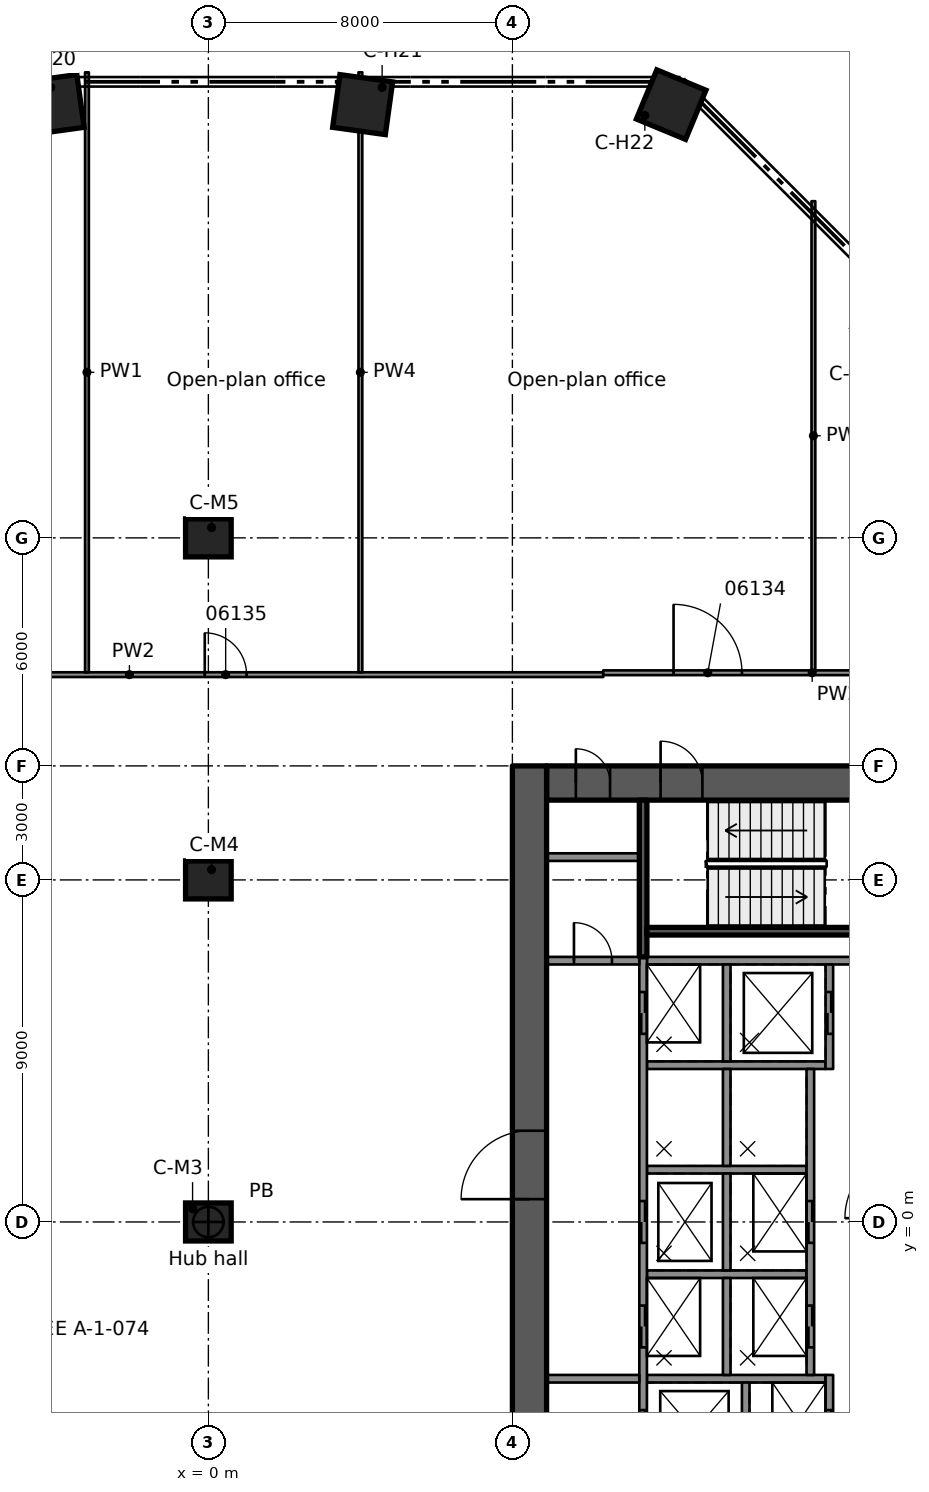
"""IFC4 building model, lengths in metres.
Left out: names, types, materials, properties, quantities, classifications, styles, units other than length and angle.
Written with IfcOpenShell. Run it as: python <this file> out.ifc"""

import sys

from ifc_helpers import new_model, si_unit, direction, frame, frame_2d, origin, origin_2d, place, context, subcontext, project, spatial, rectangle, extrude, element, fill, save


model = new_model("IFC4")
c1 = context("Model", 3, precision=1e-05, world=origin(), true_north=direction((0.0, 1.0)))
c2 = subcontext(c1, "Body", "Model", "MODEL_VIEW")
j1 = project(units=[si_unit("LENGTHUNIT", "METRE"), si_unit("PLANEANGLEUNIT", "RADIAN")], contexts=[c1])
p1 = place(None, origin())
s1 = spatial("IfcSite", under=j1, at=p1, CompositionType="ELEMENT")
p2 = place(p1, origin())
s2 = spatial("IfcBuilding", under=s1, at=p2, CompositionType="ELEMENT")
p3 = place(p2, frame((0.0, 0.0, 29.2)))
s3 = spatial("IfcBuildingStorey", under=s2, at=p3, CompositionType="ELEMENT", Elevation=29.2)
p4 = place(p3, frame((8.9, 11.55, 0.0), z_axis=(0.0, 0.0, 1.0), x_axis=(1.0, 0.0, 0.0)))
e1 = element("IfcWall", 1, at=p4, inside=s3, PredefinedType="SHEAR", context=c2, shape_type="SweptSolid", body=[
    extrude(rectangle(XDim=9.2, YDim=0.9, at=frame_2d((4.6, 0.0))), origin(), (0.0, 0.0, 1.0), 4.1),
])
p5 = place(p4, frame((3.0, 0.0, 0.0)))
e2 = element("IfcOpeningElement", 2, at=p5, cuts=e1, PredefinedType="OPENING", context=c2, shape_type="SweptSolid", body=[
    extrude(rectangle(XDim=1.1, YDim=2.1, at=frame_2d((0.55, 1.05))), frame((0.0, 0.46, 0.0), z_axis=(0.0, -1.0, 0.0), x_axis=(1.0, 0.0, 0.0)), (0.0, 0.0, 1.0), 0.92),
])
p6 = place(p4, frame((0.77, 0.0, 0.0)))
e3 = element("IfcOpeningElement", 3, at=p6, cuts=e1, PredefinedType="OPENING", context=c2, shape_type="SweptSolid", body=[
    extrude(rectangle(XDim=0.9, YDim=2.1, at=frame_2d((0.45, 1.05))), frame((0.0, 0.46, 0.0), z_axis=(0.0, -1.0, 0.0), x_axis=(1.0, 0.0, 0.0)), (0.0, 0.0, 1.0), 0.92),
])
p7 = place(p3, frame((8.45, -12.0, 0.0), z_axis=(0.0, 0.0, 1.0), x_axis=(0.0, 1.0, 0.0)))
e4 = element("IfcWall", 4, at=p7, inside=s3, PredefinedType="SHEAR", context=c2, shape_type="SweptSolid", body=[
    extrude(rectangle(XDim=24.0, YDim=0.9, at=frame_2d((12.0, 0.0))), origin(), (0.0, 0.0, 1.0), 4.1),
])
p8 = place(p7, frame((12.6, 0.0, 0.0)))
e5 = element("IfcOpeningElement", 5, at=p8, cuts=e4, PredefinedType="OPENING", context=c2, shape_type="SweptSolid", body=[
    extrude(rectangle(XDim=1.8, YDim=2.1, at=frame_2d((0.9, 1.05))), frame((0.0, 0.46, 0.0), z_axis=(0.0, -1.0, 0.0), x_axis=(1.0, 0.0, 0.0)), (0.0, 0.0, 1.0), 0.92),
])
p9 = place(p7, frame((3.25, 0.0, 0.0)))
e6 = element("IfcOpeningElement", 6, at=p9, cuts=e4, PredefinedType="OPENING", context=c2, shape_type="SweptSolid", body=[
    extrude(rectangle(XDim=1.1, YDim=2.1, at=frame_2d((0.55, 1.05))), frame((0.0, 0.46, 0.0), z_axis=(0.0, -1.0, 0.0), x_axis=(1.0, 0.0, 0.0)), (0.0, 0.0, 1.0), 0.92),
])
for number, where, z_axis, x_axis in (
    (7, (-4.059, 29.4, 0.0), (0.0, 0.0, 1.0), (-0.137, 0.991, 0.0)),
    (8, (4.059, 29.4, 0.0), (0.0, 0.0, 1.0), (0.137, 0.991, 0.0)),
    (9, (12.178, 29.4, 0.0), (0.0, 0.0, 1.0), (0.383, 0.924, 0.0)),
):
    element("IfcColumn", number, at=place(p3, frame(where, z_axis=z_axis, x_axis=x_axis)), inside=s3, PredefinedType="COLUMN", context=c2, shape_type="SweptSolid", body=[
        extrude(rectangle(XDim=1.4, YDim=1.4, at=origin_2d()), origin(), (0.0, 0.0, 1.0), 4.1),
    ])
for number, where, z_axis, x_axis in (
    (10, (0.0, 0.0, 0.0), (0.0, 0.0, 1.0), (1.0, 0.0, 0.0)),
    (11, (0.0, 9.0, 0.0), (0.0, 0.0, 1.0), (1.0, 0.0, 0.0)),
    (12, (0.0, 18.0, 0.0), (0.0, 0.0, 1.0), (1.0, 0.0, 0.0)),
):
    element("IfcColumn", number, at=place(p3, frame(where, z_axis=z_axis, x_axis=x_axis)), inside=s3, PredefinedType="COLUMN", context=c2, shape_type="SweptSolid", body=[
        extrude(rectangle(XDim=1.2, YDim=1.0, at=origin_2d()), origin(), (0.0, 0.0, 1.0), 4.1),
    ])
p10 = place(p3, frame((11.54, 6.875, 0.0), z_axis=(0.0, 0.0, 1.0), x_axis=(1.0, 0.0, 0.0)))
e13 = element("IfcWall", 13, at=p10, inside=s3, PredefinedType="SOLIDWALL", context=c2, shape_type="SweptSolid", body=[
    extrude(rectangle(XDim=6.56, YDim=0.2, at=frame_2d((3.28, 0.0))), origin(), (0.0, 0.0, 1.0), 3.68),
])
p11 = place(p3, frame((11.54, 4.125, 0.0), z_axis=(0.0, 0.0, 1.0), x_axis=(1.0, 0.0, 0.0)))
e14 = element("IfcWall", 14, at=p11, inside=s3, PredefinedType="SOLIDWALL", context=c2, shape_type="SweptSolid", body=[
    extrude(rectangle(XDim=4.7, YDim=0.2, at=frame_2d((2.35, 0.0))), origin(), (0.0, 0.0, 1.0), 3.68),
])
for number, where, z_axis, x_axis in (
    (15, (11.54, 1.375, 0.0), (0.0, 0.0, 1.0), (1.0, 0.0, 0.0)),
    (16, (11.54, -1.375, 0.0), (0.0, 0.0, 1.0), (1.0, 0.0, 0.0)),
):
    element("IfcWall", number, at=place(p3, frame(where, z_axis=z_axis, x_axis=x_axis)), inside=s3, PredefinedType="SOLIDWALL", context=c2, shape_type="SweptSolid", body=[
        extrude(rectangle(XDim=4.2, YDim=0.2, at=frame_2d((2.1, 0.0))), origin(), (0.0, 0.0, 1.0), 3.68),
    ])
p12 = place(p3, frame((11.54, -4.125, 0.0), z_axis=(0.0, 0.0, 1.0), x_axis=(1.0, 0.0, 0.0)))
e17 = element("IfcWall", 17, at=p12, inside=s3, PredefinedType="SOLIDWALL", context=c2, shape_type="SweptSolid", body=[
    extrude(rectangle(XDim=4.7, YDim=0.2, at=frame_2d((2.35, 0.0))), origin(), (0.0, 0.0, 1.0), 3.68),
])
p13 = place(p3, frame((11.44, 6.975, 0.0), z_axis=(0.0, 0.0, 1.0), x_axis=(0.0, -1.0, 0.0)))
e18 = element("IfcWall", 18, at=p13, inside=s3, PredefinedType="SOLIDWALL", context=c2, shape_type="SweptSolid", body=[
    extrude(rectangle(XDim=13.95, YDim=0.2, at=frame_2d((6.975, 0.0))), origin(), (0.0, 0.0, 1.0), 3.68),
])
p14 = place(p13, frame((0.925, 0.0, 0.0)))
e19 = element("IfcOpeningElement", 19, at=p14, cuts=e18, PredefinedType="OPENING", context=c2, shape_type="SweptSolid", body=[
    extrude(rectangle(XDim=1.1, YDim=2.1, at=frame_2d((0.55, 1.05))), frame((0.0, 0.11, 0.0), z_axis=(0.0, -1.0, 0.0), x_axis=(1.0, 0.0, 0.0)), (0.0, 0.0, 1.0), 0.22),
])
p15 = place(p13, frame((6.425, 0.0, 0.0)))
e20 = element("IfcOpeningElement", 20, at=p15, cuts=e18, PredefinedType="OPENING", context=c2, shape_type="SweptSolid", body=[
    extrude(rectangle(XDim=1.1, YDim=2.1, at=frame_2d((0.55, 1.05))), frame((0.0, 0.11, 0.0), z_axis=(0.0, -1.0, 0.0), x_axis=(1.0, 0.0, 0.0)), (0.0, 0.0, 1.0), 0.22),
])
p16 = place(p13, frame((9.175, 0.0, 0.0)))
e21 = element("IfcOpeningElement", 21, at=p16, cuts=e18, PredefinedType="OPENING", context=c2, shape_type="SweptSolid", body=[
    extrude(rectangle(XDim=1.1, YDim=2.1, at=frame_2d((0.55, 1.05))), frame((0.0, 0.11, 0.0), z_axis=(0.0, -1.0, 0.0), x_axis=(1.0, 0.0, 0.0)), (0.0, 0.0, 1.0), 0.22),
])
p17 = place(p13, frame((11.925, 0.0, 0.0)))
e22 = element("IfcOpeningElement", 22, at=p17, cuts=e18, PredefinedType="OPENING", context=c2, shape_type="SweptSolid", body=[
    extrude(rectangle(XDim=1.1, YDim=2.1, at=frame_2d((0.55, 1.05))), frame((0.0, 0.11, 0.0), z_axis=(0.0, -1.0, 0.0), x_axis=(1.0, 0.0, 0.0)), (0.0, 0.0, 1.0), 0.22),
])
for number, where, z_axis, x_axis in (
    (23, (13.64, 6.775, 0.0), (0.0, 0.0, 1.0), (0.0, -1.0, 0.0)),
    (24, (13.64, 4.025, 0.0), (0.0, 0.0, 1.0), (0.0, -1.0, 0.0)),
    (25, (13.64, 1.275, 0.0), (0.0, 0.0, 1.0), (0.0, -1.0, 0.0)),
    (26, (13.64, -1.475, 0.0), (0.0, 0.0, 1.0), (0.0, -1.0, 0.0)),
    (27, (14.14, -4.225, 0.0), (0.0, 0.0, 1.0), (0.0, -1.0, 0.0)),
):
    element("IfcWall", number, at=place(p3, frame(where, z_axis=z_axis, x_axis=x_axis)), inside=s3, PredefinedType="SOLIDWALL", context=c2, shape_type="SweptSolid", body=[
        extrude(rectangle(XDim=2.55, YDim=0.2, at=frame_2d((1.275, 0.0))), origin(), (0.0, 0.0, 1.0), 3.68),
    ])
p18 = place(p3, frame((16.34, 6.775, 0.0), z_axis=(0.0, 0.0, 1.0), x_axis=(0.0, -1.0, 0.0)))
e28 = element("IfcWall", 28, at=p18, inside=s3, PredefinedType="SOLIDWALL", context=c2, shape_type="SweptSolid", body=[
    extrude(rectangle(XDim=2.75, YDim=0.2, at=frame_2d((1.375, 0.0))), origin(), (0.0, 0.0, 1.0), 3.68),
])
p19 = place(p18, frame((0.725, 0.0, 0.0)))
e29 = element("IfcOpeningElement", 29, at=p19, cuts=e28, PredefinedType="OPENING", context=c2, shape_type="SweptSolid", body=[
    extrude(rectangle(XDim=1.1, YDim=2.1, at=frame_2d((0.55, 1.05))), frame((0.0, 0.11, 0.0), z_axis=(0.0, -1.0, 0.0), x_axis=(1.0, 0.0, 0.0)), (0.0, 0.0, 1.0), 0.22),
])
p20 = place(p3, frame((15.84, 4.025, 0.0), z_axis=(0.0, 0.0, 1.0), x_axis=(0.0, -1.0, 0.0)))
e30 = element("IfcWall", 30, at=p20, inside=s3, PredefinedType="SOLIDWALL", context=c2, shape_type="SweptSolid", body=[
    extrude(rectangle(XDim=8.05, YDim=0.2, at=frame_2d((4.025, 0.0))), origin(), (0.0, 0.0, 1.0), 3.68),
])
p21 = place(p20, frame((3.475, 0.0, 0.0)))
e31 = element("IfcOpeningElement", 31, at=p21, cuts=e30, PredefinedType="OPENING", context=c2, shape_type="SweptSolid", body=[
    extrude(rectangle(XDim=1.1, YDim=2.1, at=frame_2d((0.55, 1.05))), frame((0.0, 0.11, 0.0), z_axis=(0.0, -1.0, 0.0), x_axis=(1.0, 0.0, 0.0)), (0.0, 0.0, 1.0), 0.22),
])
p22 = place(p20, frame((6.225, 0.0, 0.0)))
e32 = element("IfcOpeningElement", 32, at=p22, cuts=e30, PredefinedType="OPENING", context=c2, shape_type="SweptSolid", body=[
    extrude(rectangle(XDim=1.1, YDim=2.1, at=frame_2d((0.55, 1.05))), frame((0.0, 0.11, 0.0), z_axis=(0.0, -1.0, 0.0), x_axis=(1.0, 0.0, 0.0)), (0.0, 0.0, 1.0), 0.22),
])
p23 = place(p3, frame((16.34, -4.025, 0.0), z_axis=(0.0, 0.0, 1.0), x_axis=(0.0, -1.0, 0.0)))
e33 = element("IfcWall", 33, at=p23, inside=s3, PredefinedType="SOLIDWALL", context=c2, shape_type="SweptSolid", body=[
    extrude(rectangle(XDim=2.75, YDim=0.2, at=frame_2d((1.375, 0.0))), origin(), (0.0, 0.0, 1.0), 3.68),
])
p24 = place(p23, frame((0.925, 0.0, 0.0)))
e34 = element("IfcOpeningElement", 34, at=p24, cuts=e33, PredefinedType="OPENING", context=c2, shape_type="SweptSolid", body=[
    extrude(rectangle(XDim=1.1, YDim=2.1, at=frame_2d((0.55, 1.05))), frame((0.0, 0.11, 0.0), z_axis=(0.0, -1.0, 0.0), x_axis=(1.0, 0.0, 0.0)), (0.0, 0.0, 1.0), 0.22),
])
p25 = place(p3, frame((11.44, 11.1, 0.0), z_axis=(0.0, 0.0, 1.0), x_axis=(0.0, -1.0, 0.0)))
e35 = element("IfcWall", 35, at=p25, inside=s3, PredefinedType="SOLIDWALL", context=c2, shape_type="SweptSolid", body=[
    extrude(rectangle(XDim=4.125, YDim=0.2, at=frame_2d((2.062, 0.0))), origin(), (0.0, 0.0, 1.0), 3.68),
])
p26 = place(p3, frame((11.54, 7.65, 0.0), z_axis=(0.0, 0.0, 1.0), x_axis=(1.0, 0.0, 0.0)))
e36 = element("IfcWall", 36, at=p26, inside=s3, PredefinedType="SOLIDWALL", context=c2, shape_type="SweptSolid", body=[
    extrude(rectangle(XDim=6.56, YDim=0.2, at=frame_2d((3.28, 0.0))), origin(), (0.0, 0.0, 1.0), 3.68),
])
p27 = place(p3, frame((8.9, -4.125, 0.0), z_axis=(0.0, 0.0, 1.0), x_axis=(1.0, 0.0, 0.0)))
e37 = element("IfcWall", 37, at=p27, inside=s3, PredefinedType="PARTITIONING", context=c2, shape_type="SweptSolid", body=[
    extrude(rectangle(XDim=2.44, YDim=0.2, at=frame_2d((1.22, 0.0))), origin(), (0.0, 0.0, 1.0), 3.68),
])
p28 = place(p3, frame((8.9, 6.875, 0.0), z_axis=(0.0, 0.0, 1.0), x_axis=(1.0, 0.0, 0.0)))
e38 = element("IfcWall", 38, at=p28, inside=s3, PredefinedType="PARTITIONING", context=c2, shape_type="SweptSolid", body=[
    extrude(rectangle(XDim=2.44, YDim=0.2, at=frame_2d((1.22, 0.0))), origin(), (0.0, 0.0, 1.0), 3.68),
])
p29 = place(p28, frame((0.72, 0.0, 0.0)))
e39 = element("IfcOpeningElement", 39, at=p29, cuts=e38, PredefinedType="OPENING", context=c2, shape_type="SweptSolid", body=[
    extrude(rectangle(XDim=1.0, YDim=2.1, at=frame_2d((0.5, 1.05))), frame((0.0, 0.11, 0.0), z_axis=(0.0, -1.0, 0.0), x_axis=(1.0, 0.0, 0.0)), (0.0, 0.0, 1.0), 0.22),
])
p30 = place(p3, frame((8.9, 9.6, 0.0), z_axis=(0.0, 0.0, 1.0), x_axis=(1.0, 0.0, 0.0)))
e40 = element("IfcWall", 40, at=p30, inside=s3, PredefinedType="PARTITIONING", context=c2, shape_type="SweptSolid", body=[
    extrude(rectangle(XDim=2.44, YDim=0.2, at=frame_2d((1.22, 0.0))), origin(), (0.0, 0.0, 1.0), 3.68),
])
p31 = place(p3, frame((-10.39, 14.401, 0.0), z_axis=(0.0, 0.0, 1.0), x_axis=(1.0, 0.0, 0.0)))
e41 = element("IfcWall", 41, at=p31, inside=s3, PredefinedType="PARTITIONING", context=c2, shape_type="SweptSolid", body=[
    extrude(rectangle(XDim=20.781, YDim=0.125, at=frame_2d((10.391, 0.0))), origin(), (0.0, 0.0, 1.0), 3.66),
])
p32 = place(p31, frame((10.295, 0.0, 0.0)))
e42 = element("IfcOpeningElement", 42, at=p32, cuts=e41, PredefinedType="OPENING", context=c2, shape_type="SweptSolid", body=[
    extrude(rectangle(XDim=1.1, YDim=2.1, at=frame_2d((0.55, 1.05))), frame((0.0, 0.073, 0.0), z_axis=(0.0, -1.0, 0.0), x_axis=(1.0, 0.0, 0.0)), (0.0, 0.0, 1.0), 0.145),
])
p33 = place(p31, frame((2.6, 0.0, 0.0)))
e43 = element("IfcOpeningElement", 43, at=p33, cuts=e41, PredefinedType="OPENING", context=c2, shape_type="SweptSolid", body=[
    extrude(rectangle(XDim=1.8, YDim=2.1, at=frame_2d((0.9, 1.05))), frame((0.0, 0.073, 0.0), z_axis=(0.0, -1.0, 0.0), x_axis=(1.0, 0.0, 0.0)), (0.0, 0.0, 1.0), 0.145),
])
p34 = place(p3, frame((10.391, 14.451, 0.0), z_axis=(0.0, 0.0, 1.0), x_axis=(1.0, 0.0, 0.0)))
e44 = element("IfcWall", 44, at=p34, inside=s3, PredefinedType="PARTITIONING", context=c2, shape_type="SweptSolid", body=[
    extrude(rectangle(XDim=10.996, YDim=0.125, at=frame_2d((5.498, 0.0))), origin(), (0.0, 0.0, 1.0), 3.66),
])
p35 = place(p34, frame((1.85, 0.0, 0.0)))
e45 = element("IfcOpeningElement", 45, at=p35, cuts=e44, PredefinedType="OPENING", context=c2, shape_type="SweptSolid", body=[
    extrude(rectangle(XDim=1.8, YDim=2.1, at=frame_2d((0.9, 1.05))), frame((0.0, 0.073, 0.0), z_axis=(0.0, -1.0, 0.0), x_axis=(1.0, 0.0, 0.0)), (0.0, 0.0, 1.0), 0.145),
])
p36 = place(p3, frame((15.921, 14.514, 0.0), z_axis=(0.0, 0.0, 1.0), x_axis=(0.0, 1.0, 0.0)))
e46 = element("IfcWall", 46, at=p36, inside=s3, PredefinedType="PARTITIONING", context=c2, shape_type="SweptSolid", body=[
    extrude(rectangle(XDim=12.345, YDim=0.1, at=frame_2d((6.172, 0.0))), origin(), (0.0, 0.0, 1.0), 3.025),
])
p37 = place(p3, frame((4.0, 14.463, 0.0), z_axis=(0.0, 0.0, 1.0), x_axis=(0.0, 1.0, 0.0)))
e47 = element("IfcWall", 47, at=p37, inside=s3, PredefinedType="PARTITIONING", context=c2, shape_type="SweptSolid", body=[
    extrude(rectangle(XDim=15.787, YDim=0.1, at=frame_2d((7.894, 0.0))), origin(), (0.0, 0.0, 1.0), 3.025),
])
p38 = place(p3, frame((-3.195, 14.463, 0.0), z_axis=(0.0, 0.0, 1.0), x_axis=(0.0, 1.0, 0.0)))
e48 = element("IfcWall", 48, at=p38, inside=s3, PredefinedType="PARTITIONING", context=c2, shape_type="SweptSolid", body=[
    extrude(rectangle(XDim=15.787, YDim=0.1, at=frame_2d((7.894, 0.0))), origin(), (0.0, 0.0, 1.0), 3.66),
])
p39 = place(p14, origin())
e49 = element("IfcDoor", 49, at=p39, inside=s3, OperationType="DOUBLE_DOOR_SLIDING", PredefinedType="DOOR", context=c2, shape_type="SweptSolid", body=[
    extrude(rectangle(XDim=1.1, YDim=2.1, at=frame_2d((0.55, 1.05))), frame((0.0, 0.025, 0.0), z_axis=(0.0, -1.0, 0.0), x_axis=(1.0, 0.0, 0.0)), (0.0, 0.0, 1.0), 0.05),
])
fill(e19, e49)
p40 = place(p19, origin())
e50 = element("IfcDoor", 50, at=p40, inside=s3, OperationType="DOUBLE_DOOR_SLIDING", PredefinedType="DOOR", context=c2, shape_type="SweptSolid", body=[
    extrude(rectangle(XDim=1.1, YDim=2.1, at=frame_2d((0.55, 1.05))), frame((0.0, 0.025, 0.0), z_axis=(0.0, -1.0, 0.0), x_axis=(1.0, 0.0, 0.0)), (0.0, 0.0, 1.0), 0.05),
])
fill(e29, e50)
p41 = place(p15, origin())
e51 = element("IfcDoor", 51, at=p41, inside=s3, OperationType="DOUBLE_DOOR_SLIDING", PredefinedType="DOOR", context=c2, shape_type="SweptSolid", body=[
    extrude(rectangle(XDim=1.1, YDim=2.1, at=frame_2d((0.55, 1.05))), frame((0.0, 0.025, 0.0), z_axis=(0.0, -1.0, 0.0), x_axis=(1.0, 0.0, 0.0)), (0.0, 0.0, 1.0), 0.05),
])
fill(e20, e51)
p42 = place(p21, origin())
e52 = element("IfcDoor", 52, at=p42, inside=s3, OperationType="DOUBLE_DOOR_SLIDING", PredefinedType="DOOR", context=c2, shape_type="SweptSolid", body=[
    extrude(rectangle(XDim=1.1, YDim=2.1, at=frame_2d((0.55, 1.05))), frame((0.0, 0.025, 0.0), z_axis=(0.0, -1.0, 0.0), x_axis=(1.0, 0.0, 0.0)), (0.0, 0.0, 1.0), 0.05),
])
fill(e31, e52)
p43 = place(p16, origin())
e53 = element("IfcDoor", 53, at=p43, inside=s3, OperationType="DOUBLE_DOOR_SLIDING", PredefinedType="DOOR", context=c2, shape_type="SweptSolid", body=[
    extrude(rectangle(XDim=1.1, YDim=2.1, at=frame_2d((0.55, 1.05))), frame((0.0, 0.025, 0.0), z_axis=(0.0, -1.0, 0.0), x_axis=(1.0, 0.0, 0.0)), (0.0, 0.0, 1.0), 0.05),
])
fill(e21, e53)
p44 = place(p22, origin())
e54 = element("IfcDoor", 54, at=p44, inside=s3, OperationType="DOUBLE_DOOR_SLIDING", PredefinedType="DOOR", context=c2, shape_type="SweptSolid", body=[
    extrude(rectangle(XDim=1.1, YDim=2.1, at=frame_2d((0.55, 1.05))), frame((0.0, 0.025, 0.0), z_axis=(0.0, -1.0, 0.0), x_axis=(1.0, 0.0, 0.0)), (0.0, 0.0, 1.0), 0.05),
])
fill(e32, e54)
p45 = place(p17, origin())
e55 = element("IfcDoor", 55, at=p45, inside=s3, OperationType="DOUBLE_DOOR_SLIDING", PredefinedType="DOOR", context=c2, shape_type="SweptSolid", body=[
    extrude(rectangle(XDim=1.1, YDim=2.1, at=frame_2d((0.55, 1.05))), frame((0.0, 0.025, 0.0), z_axis=(0.0, -1.0, 0.0), x_axis=(1.0, 0.0, 0.0)), (0.0, 0.0, 1.0), 0.05),
])
fill(e22, e55)
p46 = place(p24, origin())
e56 = element("IfcDoor", 56, at=p46, inside=s3, OperationType="DOUBLE_DOOR_SLIDING", PredefinedType="DOOR", context=c2, shape_type="SweptSolid", body=[
    extrude(rectangle(XDim=1.1, YDim=2.1, at=frame_2d((0.55, 1.05))), frame((0.0, 0.025, 0.0), z_axis=(0.0, -1.0, 0.0), x_axis=(1.0, 0.0, 0.0)), (0.0, 0.0, 1.0), 0.05),
])
fill(e34, e56)
p47 = place(p8, origin())
e57 = element("IfcDoor", 57, at=p47, inside=s3, OperationType="SINGLE_SWING_RIGHT", PredefinedType="DOOR", context=c2, shape_type="SweptSolid", body=[
    extrude(rectangle(XDim=1.8, YDim=2.1, at=frame_2d((0.9, 1.05))), frame((0.0, 0.025, 0.0), z_axis=(0.0, -1.0, 0.0), x_axis=(1.0, 0.0, 0.0)), (0.0, 0.0, 1.0), 0.05),
])
fill(e5, e57)
p48 = place(p5, origin())
e58 = element("IfcDoor", 58, at=p48, inside=s3, OperationType="SINGLE_SWING_LEFT", PredefinedType="DOOR", context=c2, shape_type="SweptSolid", body=[
    extrude(rectangle(XDim=1.1, YDim=2.1, at=frame_2d((0.55, 1.05))), frame((0.0, 0.025, 0.0), z_axis=(0.0, -1.0, 0.0), x_axis=(1.0, 0.0, 0.0)), (0.0, 0.0, 1.0), 0.05),
])
fill(e2, e58)
p49 = place(p6, origin())
e59 = element("IfcDoor", 59, at=p49, inside=s3, OperationType="SINGLE_SWING_LEFT", PredefinedType="DOOR", context=c2, shape_type="SweptSolid", body=[
    extrude(rectangle(XDim=0.9, YDim=2.1, at=frame_2d((0.45, 1.05))), frame((0.0, 0.025, 0.0), z_axis=(0.0, -1.0, 0.0), x_axis=(1.0, 0.0, 0.0)), (0.0, 0.0, 1.0), 0.05),
])
fill(e3, e59)
p50 = place(p29, origin())
e60 = element("IfcDoor", 60, at=p50, inside=s3, OperationType="SINGLE_SWING_RIGHT", PredefinedType="DOOR", context=c2, shape_type="SweptSolid", body=[
    extrude(rectangle(XDim=1.0, YDim=2.1, at=frame_2d((0.5, 1.05))), frame((0.0, 0.025, 0.0), z_axis=(0.0, -1.0, 0.0), x_axis=(1.0, 0.0, 0.0)), (0.0, 0.0, 1.0), 0.05),
])
fill(e39, e60)
p51 = place(p35, origin())
e61 = element("IfcDoor", 61, at=p51, inside=s3, OperationType="DOUBLE_DOOR_SINGLE_SWING", PredefinedType="DOOR", context=c2, shape_type="SweptSolid", body=[
    extrude(rectangle(XDim=1.8, YDim=2.1, at=frame_2d((0.9, 1.05))), frame((0.0, 0.025, 0.0), z_axis=(0.0, -1.0, 0.0), x_axis=(1.0, 0.0, 0.0)), (0.0, 0.0, 1.0), 0.05),
])
fill(e45, e61)
p52 = place(p32, origin())
e62 = element("IfcDoor", 62, at=p52, inside=s3, OperationType="SINGLE_SWING_RIGHT", PredefinedType="DOOR", context=c2, shape_type="SweptSolid", body=[
    extrude(rectangle(XDim=1.1, YDim=2.1, at=frame_2d((0.55, 1.05))), frame((0.0, 0.025, 0.0), z_axis=(0.0, -1.0, 0.0), x_axis=(1.0, 0.0, 0.0)), (0.0, 0.0, 1.0), 0.05),
])
fill(e42, e62)
save(model, sys.argv[1])
